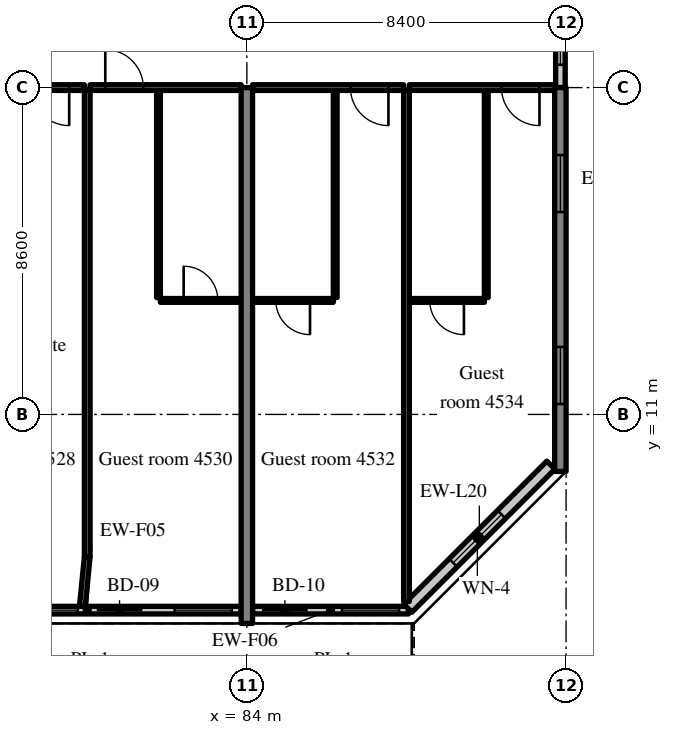
"""IFC4 building model, lengths in metres.
Left out: names, types, materials, properties, quantities, classifications, styles, units other than length and angle.
Written with IfcOpenShell. Run it as: python <this file> out.ifc"""

import sys

from ifc_helpers import new_model, si_unit, direction, frame, frame_2d, origin, place, context, subcontext, project, spatial, rectangle, extrude, source, transform, mapped, element, fill, save


model = new_model("IFC4")
c1 = context("Model", 3, precision=1e-05, world=origin(), true_north=direction((0.0, 1.0)))
c2 = subcontext(c1, "Body", "Model", "MODEL_VIEW")
j1 = project(units=[si_unit("LENGTHUNIT", "METRE"), si_unit("PLANEANGLEUNIT", "RADIAN")], contexts=[c1])
p1 = place(None, origin())
s1 = spatial("IfcSite", under=j1, at=p1, CompositionType="ELEMENT")
p2 = place(p1, origin())
s2 = spatial("IfcBuilding", under=s1, at=p2, CompositionType="ELEMENT")
p3 = place(p2, frame((0.0, 0.0, 185.8)))
s3 = spatial("IfcBuildingStorey", under=s2, at=p3, CompositionType="ELEMENT", Elevation=185.8)
m1 = source(origin(), c2, "Body", "SweptSolid", [
    extrude(rectangle(XDim=14.1, YDim=0.3, at=frame_2d((7.05, 0.0))), origin(), (0.0, 0.0, 1.0), 3.52),
])
p4 = place(p3, frame((84.0, 5.5, 0.0), z_axis=(0.0, 0.0, 1.0), x_axis=(0.0, 1.0, 0.0)))
e1 = element("IfcWall", 1, at=p4, inside=s3, PredefinedType="SHEAR", context=c2, shape_type="MappedRepresentation", body=[
    mapped(m1, transform((0.0, 0.0, 0.0), scale=1.0)),
])
m2 = source(origin(), c2, "Body", "SweptSolid", [
    extrude(rectangle(XDim=10.1, YDim=0.3, at=frame_2d((5.05, 0.0))), origin(), (0.0, 0.0, 1.0), 3.52),
])
p5 = place(p3, frame((92.25, 9.5, 0.0), z_axis=(0.0, 0.0, 1.0), x_axis=(0.0, 1.0, 0.0)))
e2 = element("IfcWall", 2, at=p5, inside=s3, PredefinedType="SHEAR", context=c2, shape_type="MappedRepresentation", body=[
    mapped(m2, transform((0.0, 0.0, 0.0), scale=1.0)),
])
m3 = source(origin(), c2, "Body", "SweptSolid", [
    extrude(rectangle(XDim=1.5, YDim=1.5, at=frame_2d((0.75, 0.75))), frame((0.0, 0.16, 0.0), z_axis=(0.0, -1.0, 0.0), x_axis=(1.0, 0.0, 0.0)), (0.0, 0.0, 1.0), 0.32),
])
p6 = place(p5, frame((1.775, 0.0, 0.9)))
e3 = element("IfcOpeningElement", 3, at=p6, cuts=e2, PredefinedType="OPENING", context=c2, shape_type="MappedRepresentation", body=[
    mapped(m3, transform((0.0, 0.0, 0.0), scale=1.0)),
])
p7 = place(p5, frame((6.825, 0.0, 0.9)))
e4 = element("IfcOpeningElement", 4, at=p7, cuts=e2, PredefinedType="OPENING", context=c2, shape_type="MappedRepresentation", body=[
    mapped(m3, transform((0.0, 0.0, 0.0), scale=1.0)),
])
m4 = source(origin(), c2, "Body", "SweptSolid", [
    extrude(rectangle(XDim=8.1, YDim=0.2, at=frame_2d((4.05, 0.0))), origin(), (0.0, 0.0, 1.0), 2.87),
])
p8 = place(p3, frame((75.75, 5.85, 0.0), z_axis=(0.0, 0.0, 1.0), x_axis=(1.0, 0.0, 0.0)))
e5 = element("IfcWall", 5, at=p8, inside=s3, PredefinedType="SOLIDWALL", context=c2, shape_type="MappedRepresentation", body=[
    mapped(m4, transform((0.0, 0.0, 0.0), scale=1.0)),
])
m5 = source(origin(), c2, "Body", "SweptSolid", [
    extrude(rectangle(XDim=1.2, YDim=2.4, at=frame_2d((0.6, 1.2))), frame((0.0, 0.11, 0.0), z_axis=(0.0, -1.0, 0.0), x_axis=(1.0, 0.0, 0.0)), (0.0, 0.0, 1.0), 0.22),
])
p9 = place(p8, frame((0.25, 0.0, 0.0)))
e6 = element("IfcOpeningElement", 6, at=p9, cuts=e5, PredefinedType="OPENING", context=c2, shape_type="MappedRepresentation", body=[
    mapped(m5, transform((0.0, 0.0, 0.0), scale=1.0)),
])
m6 = source(origin(), c2, "Body", "SweptSolid", [
    extrude(rectangle(XDim=1.5, YDim=1.5, at=frame_2d((0.75, 0.75))), frame((0.0, 0.11, 0.0), z_axis=(0.0, -1.0, 0.0), x_axis=(1.0, 0.0, 0.0)), (0.0, 0.0, 1.0), 0.22),
])
p10 = place(p8, frame((2.3, 0.0, 0.9)))
e7 = element("IfcOpeningElement", 7, at=p10, cuts=e5, PredefinedType="OPENING", context=c2, shape_type="MappedRepresentation", body=[
    mapped(m6, transform((0.0, 0.0, 0.0), scale=1.0)),
])
p11 = place(p8, frame((4.3, 0.0, 0.0)))
e8 = element("IfcOpeningElement", 8, at=p11, cuts=e5, PredefinedType="OPENING", context=c2, shape_type="MappedRepresentation", body=[
    mapped(m5, transform((0.0, 0.0, 0.0), scale=1.0)),
])
p12 = place(p8, frame((6.35, 0.0, 0.9)))
e9 = element("IfcOpeningElement", 9, at=p12, cuts=e5, PredefinedType="OPENING", context=c2, shape_type="MappedRepresentation", body=[
    mapped(m6, transform((0.0, 0.0, 0.0), scale=1.0)),
])
m7 = source(origin(), c2, "Body", "SweptSolid", [
    extrude(rectangle(XDim=4.105, YDim=0.2, at=frame_2d((2.052, 0.0))), origin(), (0.0, 0.0, 1.0), 2.87),
])
p13 = place(p3, frame((84.15, 5.85, 0.0), z_axis=(0.0, 0.0, 1.0), x_axis=(1.0, 0.0, 0.0)))
e10 = element("IfcWall", 10, at=p13, inside=s3, PredefinedType="SOLIDWALL", context=c2, shape_type="MappedRepresentation", body=[
    mapped(m7, transform((0.0, 0.0, 0.0), scale=1.0)),
])
p14 = place(p13, frame((0.25, 0.0, 0.0)))
e11 = element("IfcOpeningElement", 11, at=p14, cuts=e10, PredefinedType="OPENING", context=c2, shape_type="MappedRepresentation", body=[
    mapped(m5, transform((0.0, 0.0, 0.0), scale=1.0)),
])
p15 = place(p13, frame((2.355, 0.0, 0.9)))
e12 = element("IfcOpeningElement", 12, at=p15, cuts=e10, PredefinedType="OPENING", context=c2, shape_type="MappedRepresentation", body=[
    mapped(m6, transform((0.0, 0.0, 0.0), scale=1.0)),
])
m8 = source(origin(), c2, "Body", "SweptSolid", [
    extrude(rectangle(XDim=5.326, YDim=0.3, at=frame_2d((2.663, 0.0))), origin(), (0.0, 0.0, 1.0), 3.52),
])
p16 = place(p3, frame((88.234, 5.9, 0.0), z_axis=(0.0, 0.0, 1.0), x_axis=(0.707083859269, 0.707129702361, 0.0)))
e13 = element("IfcWall", 13, at=p16, inside=s3, PredefinedType="SOLIDWALL", context=c2, shape_type="MappedRepresentation", body=[
    mapped(m8, transform((0.0, 0.0, 0.0), scale=1.0)),
])
m9 = source(origin(), c2, "Body", "SweptSolid", [
    extrude(rectangle(XDim=1.8, YDim=1.5, at=frame_2d((0.9, 0.75))), frame((0.0, 0.16, 0.0), z_axis=(0.0, -1.0, 0.0), x_axis=(1.0, 0.0, 0.0)), (0.0, 0.0, 1.0), 0.32),
])
p17 = place(p16, frame((1.689, 0.0, 0.9)))
e14 = element("IfcOpeningElement", 14, at=p17, cuts=e13, PredefinedType="OPENING", context=c2, shape_type="MappedRepresentation", body=[
    mapped(m9, transform((0.0, 0.0, 0.0), scale=1.0)),
])
m10 = source(origin(), c2, "Body", "SweptSolid", [
    extrude(rectangle(XDim=2.4, YDim=0.25, at=frame_2d((1.2, 0.0))), origin(), (0.0, 0.0, 1.0), 2.62),
])
p18 = place(p3, frame((92.25, 19.6, 0.0), z_axis=(0.0, 0.0, 1.0), x_axis=(0.0, 1.0, 0.0)))
e15 = element("IfcWall", 15, at=p18, inside=s3, PredefinedType="SOLIDWALL", context=c2, shape_type="MappedRepresentation", body=[
    mapped(m10, transform((0.0, 0.0, 0.0), scale=1.0)),
])
m11 = source(origin(), c2, "Body", "SweptSolid", [
    extrude(rectangle(XDim=1.2, YDim=1.5, at=frame_2d((0.6, 0.75))), frame((0.0, 0.135, 0.0), z_axis=(0.0, -1.0, 0.0), x_axis=(1.0, 0.0, 0.0)), (0.0, 0.0, 1.0), 0.27),
])
p19 = place(p18, frame((0.6, 0.0, 0.9)))
e16 = element("IfcOpeningElement", 16, at=p19, cuts=e15, PredefinedType="OPENING", context=c2, shape_type="MappedRepresentation", body=[
    mapped(m11, transform((0.0, 0.0, 0.0), scale=1.0)),
])
m12 = source(origin(), c2, "Body", "SweptSolid", [
    extrude(rectangle(XDim=3.975, YDim=0.15, at=frame_2d((1.988, 0.0))), origin(), (0.0, 0.0, 1.0), 2.82),
])
p20 = place(p3, frame((75.75, 19.6, 0.0), z_axis=(0.0, 0.0, 1.0), x_axis=(1.0, 0.0, 0.0)))
e17 = element("IfcWall", 17, at=p20, inside=s3, PredefinedType="PARTITIONING", context=c2, shape_type="MappedRepresentation", body=[
    mapped(m12, transform((0.0, 0.0, 0.0), scale=1.0)),
])
m13 = source(origin(), c2, "Body", "SweptSolid", [
    extrude(rectangle(XDim=1.0, YDim=2.1, at=frame_2d((0.5, 1.05))), frame((0.0, 0.085, 0.0), z_axis=(0.0, -1.0, 0.0), x_axis=(1.0, 0.0, 0.0)), (0.0, 0.0, 1.0), 0.17),
])
p21 = place(p20, frame((2.575, 0.0, 0.0)))
e18 = element("IfcOpeningElement", 18, at=p21, cuts=e17, PredefinedType="OPENING", context=c2, shape_type="MappedRepresentation", body=[
    mapped(m13, transform((0.0, 0.0, 0.0), scale=1.0)),
])
m14 = source(origin(), c2, "Body", "SweptSolid", [
    extrude(rectangle(XDim=5.45, YDim=0.1, at=frame_2d((2.725, 0.0))), origin(), (0.0, 0.0, 1.0), 3.52),
])
p22 = place(p3, frame((81.675, 14.075, 0.0), z_axis=(0.0, 0.0, 1.0), x_axis=(0.0, 1.0, 0.0)))
e19 = element("IfcWall", 19, at=p22, inside=s3, PredefinedType="PARTITIONING", context=c2, shape_type="MappedRepresentation", body=[
    mapped(m14, transform((0.0, 0.0, 0.0), scale=1.0)),
])
m15 = source(origin(), c2, "Body", "SweptSolid", [
    extrude(rectangle(XDim=2.125, YDim=0.1, at=frame_2d((1.062, 0.0))), origin(), (0.0, 0.0, 1.0), 3.52),
])
p23 = place(p3, frame((81.725, 14.0, 0.0), z_axis=(0.0, 0.0, 1.0), x_axis=(1.0, 0.0, 0.0)))
e20 = element("IfcWall", 20, at=p23, inside=s3, PredefinedType="PARTITIONING", context=c2, shape_type="MappedRepresentation", body=[
    mapped(m15, transform((0.0, 0.0, 0.0), scale=1.0)),
])
m16 = source(origin(), c2, "Body", "SweptSolid", [
    extrude(rectangle(XDim=0.9, YDim=2.1, at=frame_2d((0.45, 1.05))), frame((0.0, 0.06, 0.0), z_axis=(0.0, -1.0, 0.0), x_axis=(1.0, 0.0, 0.0)), (0.0, 0.0, 1.0), 0.12),
])
p24 = place(p23, frame((0.612, 0.0, 0.0)))
e21 = element("IfcOpeningElement", 21, at=p24, cuts=e20, PredefinedType="OPENING", context=c2, shape_type="MappedRepresentation", body=[
    mapped(m16, transform((0.0, 0.0, 0.0), scale=1.0)),
])
p25 = place(p3, frame((79.875, 19.6, 0.0), z_axis=(0.0, 0.0, 1.0), x_axis=(1.0, 0.0, 0.0)))
e22 = element("IfcWall", 22, at=p25, inside=s3, PredefinedType="PARTITIONING", context=c2, shape_type="MappedRepresentation", body=[
    mapped(m12, transform((0.0, 0.0, 0.0), scale=1.0)),
])
p26 = place(p25, frame((0.4, 0.0, 0.0)))
e23 = element("IfcOpeningElement", 23, at=p26, cuts=e22, PredefinedType="OPENING", context=c2, shape_type="MappedRepresentation", body=[
    mapped(m13, transform((0.0, 0.0, 0.0), scale=1.0)),
])
m17 = source(origin(), c2, "Body", "SweptSolid", [
    extrude(rectangle(XDim=12.275, YDim=0.15, at=frame_2d((6.137, 0.0))), origin(), (0.0, 0.0, 1.0), 3.52),
])
p27 = place(p3, frame((79.8, 7.25, 0.0), z_axis=(0.0, 0.0, 1.0), x_axis=(0.0, 1.0, 0.0)))
e24 = element("IfcWall", 24, at=p27, inside=s3, PredefinedType="PARTITIONING", context=c2, shape_type="MappedRepresentation", body=[
    mapped(m17, transform((0.0, 0.0, 0.0), scale=1.0)),
])
p28 = place(p3, frame((86.325, 14.075, 0.0), z_axis=(0.0, 0.0, 1.0), x_axis=(0.0, 1.0, 0.0)))
e25 = element("IfcWall", 25, at=p28, inside=s3, PredefinedType="PARTITIONING", context=c2, shape_type="MappedRepresentation", body=[
    mapped(m14, transform((0.0, 0.0, 0.0), scale=1.0)),
])
p29 = place(p3, frame((84.15, 14.0, 0.0), z_axis=(0.0, 0.0, 1.0), x_axis=(1.0, 0.0, 0.0)))
e26 = element("IfcWall", 26, at=p29, inside=s3, PredefinedType="PARTITIONING", context=c2, shape_type="MappedRepresentation", body=[
    mapped(m15, transform((0.0, 0.0, 0.0), scale=1.0)),
])
p30 = place(p29, frame((0.612, 0.0, 0.0)))
e27 = element("IfcOpeningElement", 27, at=p30, cuts=e26, PredefinedType="OPENING", context=c2, shape_type="MappedRepresentation", body=[
    mapped(m16, transform((0.0, 0.0, 0.0), scale=1.0)),
])
p31 = place(p3, frame((84.15, 19.6, 0.0), z_axis=(0.0, 0.0, 1.0), x_axis=(1.0, 0.0, 0.0)))
e28 = element("IfcWall", 28, at=p31, inside=s3, PredefinedType="PARTITIONING", context=c2, shape_type="MappedRepresentation", body=[
    mapped(m12, transform((0.0, 0.0, 0.0), scale=1.0)),
])
p32 = place(p31, frame((2.575, 0.0, 0.0)))
e29 = element("IfcOpeningElement", 29, at=p32, cuts=e28, PredefinedType="OPENING", context=c2, shape_type="MappedRepresentation", body=[
    mapped(m13, transform((0.0, 0.0, 0.0), scale=1.0)),
])
p33 = place(p3, frame((90.3, 14.075, 0.0), z_axis=(0.0, 0.0, 1.0), x_axis=(0.0, 1.0, 0.0)))
e30 = element("IfcWall", 30, at=p33, inside=s3, PredefinedType="PARTITIONING", context=c2, shape_type="MappedRepresentation", body=[
    mapped(m14, transform((0.0, 0.0, 0.0), scale=1.0)),
])
m18 = source(origin(), c2, "Body", "SweptSolid", [
    extrude(rectangle(XDim=1.975, YDim=0.1, at=frame_2d((0.988, 0.0))), origin(), (0.0, 0.0, 1.0), 3.52),
])
p34 = place(p3, frame((88.275, 14.0, 0.0), z_axis=(0.0, 0.0, 1.0), x_axis=(1.0, 0.0, 0.0)))
e31 = element("IfcWall", 31, at=p34, inside=s3, PredefinedType="PARTITIONING", context=c2, shape_type="MappedRepresentation", body=[
    mapped(m18, transform((0.0, 0.0, 0.0), scale=1.0)),
])
p35 = place(p34, frame((0.537, 0.0, 0.0)))
e32 = element("IfcOpeningElement", 32, at=p35, cuts=e31, PredefinedType="OPENING", context=c2, shape_type="MappedRepresentation", body=[
    mapped(m16, transform((0.0, 0.0, 0.0), scale=1.0)),
])
m19 = source(origin(), c2, "Body", "SweptSolid", [
    extrude(rectangle(XDim=3.825, YDim=0.15, at=frame_2d((1.913, 0.0))), origin(), (0.0, 0.0, 1.0), 2.82),
])
p36 = place(p3, frame((88.275, 19.6, 0.0), z_axis=(0.0, 0.0, 1.0), x_axis=(1.0, 0.0, 0.0)))
e33 = element("IfcWall", 33, at=p36, inside=s3, PredefinedType="PARTITIONING", context=c2, shape_type="MappedRepresentation", body=[
    mapped(m19, transform((0.0, 0.0, 0.0), scale=1.0)),
])
p37 = place(p36, frame((2.425, 0.0, 0.0)))
e34 = element("IfcOpeningElement", 34, at=p37, cuts=e33, PredefinedType="OPENING", context=c2, shape_type="MappedRepresentation", body=[
    mapped(m13, transform((0.0, 0.0, 0.0), scale=1.0)),
])
m20 = source(origin(), c2, "Body", "SweptSolid", [
    extrude(rectangle(XDim=13.447, YDim=0.15, at=frame_2d((6.724, 0.0))), origin(), (0.0, 0.0, 1.0), 3.52),
])
p38 = place(p3, frame((88.2, 6.078, 0.0), z_axis=(0.0, 0.0, 1.0), x_axis=(0.0, 1.0, 0.0)))
e35 = element("IfcWall", 35, at=p38, inside=s3, PredefinedType="PARTITIONING", context=c2, shape_type="MappedRepresentation", body=[
    mapped(m20, transform((0.0, 0.0, 0.0), scale=1.0)),
])
m21 = source(origin(), c2, "Body", "SweptSolid", [
    extrude(rectangle(XDim=1.307, YDim=0.15, at=frame_2d((0.653, 0.0))), origin(), (0.0, 0.0, 1.0), 3.52),
])
p39 = place(p3, frame((79.67, 5.95, 0.0), z_axis=(0.0, 0.0, 1.0), x_axis=(0.099596223396, 0.99502793543, 0.0)))
e36 = element("IfcWall", 36, at=p39, inside=s3, PredefinedType="PARTITIONING", context=c2, shape_type="MappedRepresentation", body=[
    mapped(m21, transform((0.0, 0.0, 0.0), scale=1.0)),
])
m22 = source(origin(), c2, "Body", "SweptSolid", [
    extrude(rectangle(XDim=1.5, YDim=1.5, at=frame_2d((0.75, 0.75))), frame((0.0, 0.03, 0.0), z_axis=(0.0, -1.0, 0.0), x_axis=(1.0, 0.0, 0.0)), (0.0, 0.0, 1.0), 0.06),
])
p40 = place(p10, origin())
e37 = element("IfcWindow", 37, at=p40, inside=s3, PartitioningType="SINGLE_PANEL", PredefinedType="WINDOW", context=c2, shape_type="MappedRepresentation", body=[
    mapped(m22, transform((0.0, 0.0, 0.0), scale=1.0)),
])
fill(e7, e37)
m23 = source(origin(), c2, "Body", "SweptSolid", [
    extrude(rectangle(XDim=1.2, YDim=2.4, at=frame_2d((0.6, 1.2))), frame((0.0, 0.025, 0.0), z_axis=(0.0, -1.0, 0.0), x_axis=(1.0, 0.0, 0.0)), (0.0, 0.0, 1.0), 0.05),
])
p41 = place(p11, origin())
e38 = element("IfcDoor", 38, at=p41, inside=s3, OperationType="SLIDING_TO_LEFT", PredefinedType="DOOR", context=c2, shape_type="MappedRepresentation", body=[
    mapped(m23, transform((0.0, 0.0, 0.0), scale=1.0)),
])
fill(e8, e38)
p42 = place(p12, origin())
e39 = element("IfcWindow", 39, at=p42, inside=s3, PartitioningType="SINGLE_PANEL", PredefinedType="WINDOW", context=c2, shape_type="MappedRepresentation", body=[
    mapped(m22, transform((0.0, 0.0, 0.0), scale=1.0)),
])
fill(e9, e39)
p43 = place(p14, origin())
e40 = element("IfcDoor", 40, at=p43, inside=s3, OperationType="SLIDING_TO_RIGHT", PredefinedType="DOOR", context=c2, shape_type="MappedRepresentation", body=[
    mapped(m23, transform((0.0, 0.0, 0.0), scale=1.0)),
])
fill(e11, e40)
p44 = place(p15, origin())
e41 = element("IfcWindow", 41, at=p44, inside=s3, PartitioningType="SINGLE_PANEL", PredefinedType="WINDOW", context=c2, shape_type="MappedRepresentation", body=[
    mapped(m22, transform((0.0, 0.0, 0.0), scale=1.0)),
])
fill(e12, e41)
m24 = source(origin(), c2, "Body", "SweptSolid", [
    extrude(rectangle(XDim=1.8, YDim=1.5, at=frame_2d((0.9, 0.75))), frame((0.0, 0.03, 0.0), z_axis=(0.0, -1.0, 0.0), x_axis=(1.0, 0.0, 0.0)), (0.0, 0.0, 1.0), 0.06),
])
p45 = place(p17, origin())
e42 = element("IfcWindow", 42, at=p45, inside=s3, PartitioningType="SINGLE_PANEL", PredefinedType="WINDOW", context=c2, shape_type="MappedRepresentation", body=[
    mapped(m24, transform((0.0, 0.0, 0.0), scale=1.0)),
])
fill(e14, e42)
p46 = place(p6, origin())
e43 = element("IfcWindow", 43, at=p46, inside=s3, PartitioningType="SINGLE_PANEL", PredefinedType="WINDOW", context=c2, shape_type="MappedRepresentation", body=[
    mapped(m22, transform((0.0, 0.0, 0.0), scale=1.0)),
])
fill(e3, e43)
p47 = place(p7, origin())
e44 = element("IfcWindow", 44, at=p47, inside=s3, PartitioningType="SINGLE_PANEL", PredefinedType="WINDOW", context=c2, shape_type="MappedRepresentation", body=[
    mapped(m22, transform((0.0, 0.0, 0.0), scale=1.0)),
])
fill(e4, e44)
m25 = source(origin(), c2, "Body", "SweptSolid", [
    extrude(rectangle(XDim=1.2, YDim=1.5, at=frame_2d((0.6, 0.75))), frame((0.0, 0.03, 0.0), z_axis=(0.0, -1.0, 0.0), x_axis=(1.0, 0.0, 0.0)), (0.0, 0.0, 1.0), 0.06),
])
p48 = place(p19, origin())
e45 = element("IfcWindow", 45, at=p48, inside=s3, PartitioningType="SINGLE_PANEL", PredefinedType="WINDOW", context=c2, shape_type="MappedRepresentation", body=[
    mapped(m25, transform((0.0, 0.0, 0.0), scale=1.0)),
])
fill(e16, e45)
m26 = source(origin(), c2, "Body", "SweptSolid", [
    extrude(rectangle(XDim=1.0, YDim=2.1, at=frame_2d((0.5, 1.05))), frame((0.0, 0.025, 0.0), z_axis=(0.0, -1.0, 0.0), x_axis=(1.0, 0.0, 0.0)), (0.0, 0.0, 1.0), 0.05),
])
p49 = place(p21, origin())
e46 = element("IfcDoor", 46, at=p49, inside=s3, OperationType="SINGLE_SWING_RIGHT", PredefinedType="DOOR", context=c2, shape_type="MappedRepresentation", body=[
    mapped(m26, transform((0.0, 0.0, 0.0), scale=1.0)),
])
fill(e18, e46)
m27 = source(origin(), c2, "Body", "SweptSolid", [
    extrude(rectangle(XDim=0.9, YDim=2.1, at=frame_2d((0.45, 1.05))), frame((0.0, 0.025, 0.0), z_axis=(0.0, -1.0, 0.0), x_axis=(1.0, 0.0, 0.0)), (0.0, 0.0, 1.0), 0.05),
])
p50 = place(p24, origin())
e47 = element("IfcDoor", 47, at=p50, inside=s3, OperationType="SINGLE_SWING_LEFT", PredefinedType="DOOR", context=c2, shape_type="MappedRepresentation", body=[
    mapped(m27, transform((0.0, 0.0, 0.0), scale=1.0)),
])
fill(e21, e47)
p51 = place(p26, origin())
e48 = element("IfcDoor", 48, at=p51, inside=s3, OperationType="SINGLE_SWING_LEFT", PredefinedType="DOOR", context=c2, shape_type="MappedRepresentation", body=[
    mapped(m26, transform((0.0, 0.0, 0.0), scale=1.0)),
])
fill(e23, e48)
p52 = place(p30, origin())
e49 = element("IfcDoor", 49, at=p52, inside=s3, OperationType="SINGLE_SWING_RIGHT", PredefinedType="DOOR", context=c2, shape_type="MappedRepresentation", body=[
    mapped(m27, transform((0.0, 0.0, 0.0), scale=1.0)),
])
fill(e27, e49)
p53 = place(p32, origin())
e50 = element("IfcDoor", 50, at=p53, inside=s3, OperationType="SINGLE_SWING_RIGHT", PredefinedType="DOOR", context=c2, shape_type="MappedRepresentation", body=[
    mapped(m26, transform((0.0, 0.0, 0.0), scale=1.0)),
])
fill(e29, e50)
p54 = place(p35, origin())
e51 = element("IfcDoor", 51, at=p54, inside=s3, OperationType="SINGLE_SWING_RIGHT", PredefinedType="DOOR", context=c2, shape_type="MappedRepresentation", body=[
    mapped(m27, transform((0.0, 0.0, 0.0), scale=1.0)),
])
fill(e32, e51)
p55 = place(p37, origin())
e52 = element("IfcDoor", 52, at=p55, inside=s3, OperationType="SINGLE_SWING_RIGHT", PredefinedType="DOOR", context=c2, shape_type="MappedRepresentation", body=[
    mapped(m26, transform((0.0, 0.0, 0.0), scale=1.0)),
])
fill(e34, e52)
save(model, sys.argv[1])
